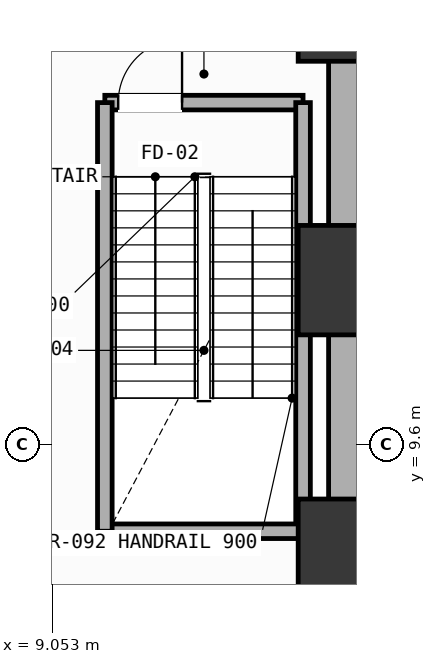
"""IFC4 building model, lengths in metres.
Left out: names, types, materials, properties, quantities, classifications, styles, units other than length and angle.
Written with IfcOpenShell. Run it as: python <this file> out.ifc"""

import sys

from ifc_helpers import new_model, si_unit, direction, frame, frame_2d, origin, origin_2d, place, context, subcontext, project, spatial, rectangle, extrude, element, fill, save


model = new_model("IFC4")
c1 = context("Model", 3, precision=1e-05, world=origin(), true_north=direction((0.0, 1.0)))
c2 = subcontext(c1, "Body", "Model", "MODEL_VIEW")
j1 = project(units=[si_unit("LENGTHUNIT", "METRE"), si_unit("PLANEANGLEUNIT", "RADIAN")], contexts=[c1])
p1 = place(None, origin())
s1 = spatial("IfcSite", under=j1, at=p1, CompositionType="ELEMENT")
p2 = place(p1, origin())
s2 = spatial("IfcBuilding", under=s1, at=p2, CompositionType="ELEMENT")
p3 = place(p2, frame((0.0, 0.0, -4.8)))
s3 = spatial("IfcBuildingStorey", under=s2, at=p3, CompositionType="ELEMENT", Elevation=-4.8)
for number, where, z_axis, x_axis in (
    (1, (14.0, 7.8, 0.0), (0.0, 0.0, 1.0), (1.0, 0.0, 0.0)),
    (2, (14.0, 12.3, 0.0), (0.0, 0.0, 1.0), (1.0, 0.0, 0.0)),
    (3, (14.0, 16.8, 0.0), (0.0, 0.0, 1.0), (1.0, 0.0, 0.0)),
):
    element("IfcColumn", number, at=place(p3, frame(where, z_axis=z_axis, x_axis=x_axis)), inside=s3, PredefinedType="COLUMN", context=c2, shape_type="SweptSolid", body=[
        extrude(rectangle(XDim=1.8, YDim=1.8, at=origin_2d()), origin(), (0.0, 0.0, 1.0), 4.8),
    ])
p4 = place(p3, frame((9.92, 15.22, 0.0), z_axis=(0.0, 0.0, 1.0), x_axis=(1.0, 0.0, 0.0)))
e4 = element("IfcWall", 4, at=p4, inside=s3, PredefinedType="SOLIDWALL", context=c2, shape_type="SweptSolid", body=[
    extrude(rectangle(XDim=3.26, YDim=0.24, at=frame_2d((1.63, 0.0))), origin(), (0.0, 0.0, 1.0), 4.55),
])
p5 = place(p4, frame((0.22, 0.0, 0.0)))
e5 = element("IfcOpeningElement", 5, at=p5, cuts=e4, PredefinedType="OPENING", context=c2, shape_type="SweptSolid", body=[
    extrude(rectangle(XDim=1.05, YDim=2.15, at=frame_2d((0.525, 1.075))), frame((0.0, 0.13, 0.0), z_axis=(0.0, -1.0, 0.0), x_axis=(1.0, 0.0, 0.0)), (0.0, 0.0, 1.0), 0.26),
])
p6 = place(p3, frame((13.18, 15.22, 0.0), z_axis=(0.0, 0.0, 1.0), x_axis=(0.0, -1.0, 0.0)))
e6 = element("IfcWall", 6, at=p6, inside=s3, PredefinedType="SOLIDWALL", context=c2, shape_type="SweptSolid", body=[
    extrude(rectangle(XDim=7.05, YDim=0.24, at=frame_2d((3.525, 0.0))), origin(), (0.0, 0.0, 1.0), 4.55),
])
p7 = place(p3, frame((13.18, 8.17, 0.0), z_axis=(0.0, 0.0, 1.0), x_axis=(-1.0, 0.0, 0.0)))
e7 = element("IfcWall", 7, at=p7, inside=s3, PredefinedType="SOLIDWALL", context=c2, shape_type="SweptSolid", body=[
    extrude(rectangle(XDim=3.26, YDim=0.24, at=frame_2d((1.63, 0.0))), origin(), (0.0, 0.0, 1.0), 4.55),
])
p8 = place(p3, frame((9.92, 8.17, 0.0), z_axis=(0.0, 0.0, 1.0), x_axis=(0.0, 1.0, 0.0)))
e8 = element("IfcWall", 8, at=p8, inside=s3, PredefinedType="SOLIDWALL", context=c2, shape_type="SweptSolid", body=[
    extrude(rectangle(XDim=7.05, YDim=0.24, at=frame_2d((3.525, 0.0))), origin(), (0.0, 0.0, 1.0), 4.55),
])
p9 = place(p3, frame((14.0, 7.8, 0.0), z_axis=(0.0, 0.0, 1.0), x_axis=(1.0, 0.0, 0.0)))
e9 = element("IfcWall", 9, at=p9, inside=s3, PredefinedType="SHEAR", context=c2, shape_type="SweptSolid", body=[
    extrude(rectangle(XDim=10.8, YDim=0.8, at=frame_2d((5.4, 0.0))), origin(), (0.0, 0.0, 1.0), 4.55),
])
p10 = place(p3, frame((14.0, 16.8, 0.0), z_axis=(0.0, 0.0, 1.0), x_axis=(0.0, -1.0, 0.0)))
e10 = element("IfcWall", 10, at=p10, inside=s3, PredefinedType="SHEAR", context=c2, shape_type="SweptSolid", body=[
    extrude(rectangle(XDim=9.0, YDim=0.8, at=frame_2d((4.5, 0.0))), origin(), (0.0, 0.0, 1.0), 4.55),
])
p11 = place(p3, frame((13.92, 5.0, 0.0), z_axis=(0.0, 0.0, 1.0), x_axis=(0.0, 1.0, 0.0)))
e11 = element("IfcWall", 11, at=p11, inside=s3, PredefinedType="PARTITIONING", context=c2, shape_type="SweptSolid", body=[
    extrude(rectangle(XDim=2.35, YDim=0.15, at=frame_2d((1.175, 0.0))), origin(), (0.0, 0.0, 1.0), 4.55),
])
p12 = place(p5, origin())
e12 = element("IfcDoor", 12, at=p12, inside=s3, OperationType="SINGLE_SWING_RIGHT", PredefinedType="DOOR", context=c2, shape_type="SweptSolid", body=[
    extrude(rectangle(XDim=1.05, YDim=2.15, at=frame_2d((0.525, 1.075))), frame((0.0, 0.025, 0.0), z_axis=(0.0, -1.0, 0.0), x_axis=(1.0, 0.0, 0.0)), (0.0, 0.0, 1.0), 0.05),
])
fill(e5, e12)
save(model, sys.argv[1])
